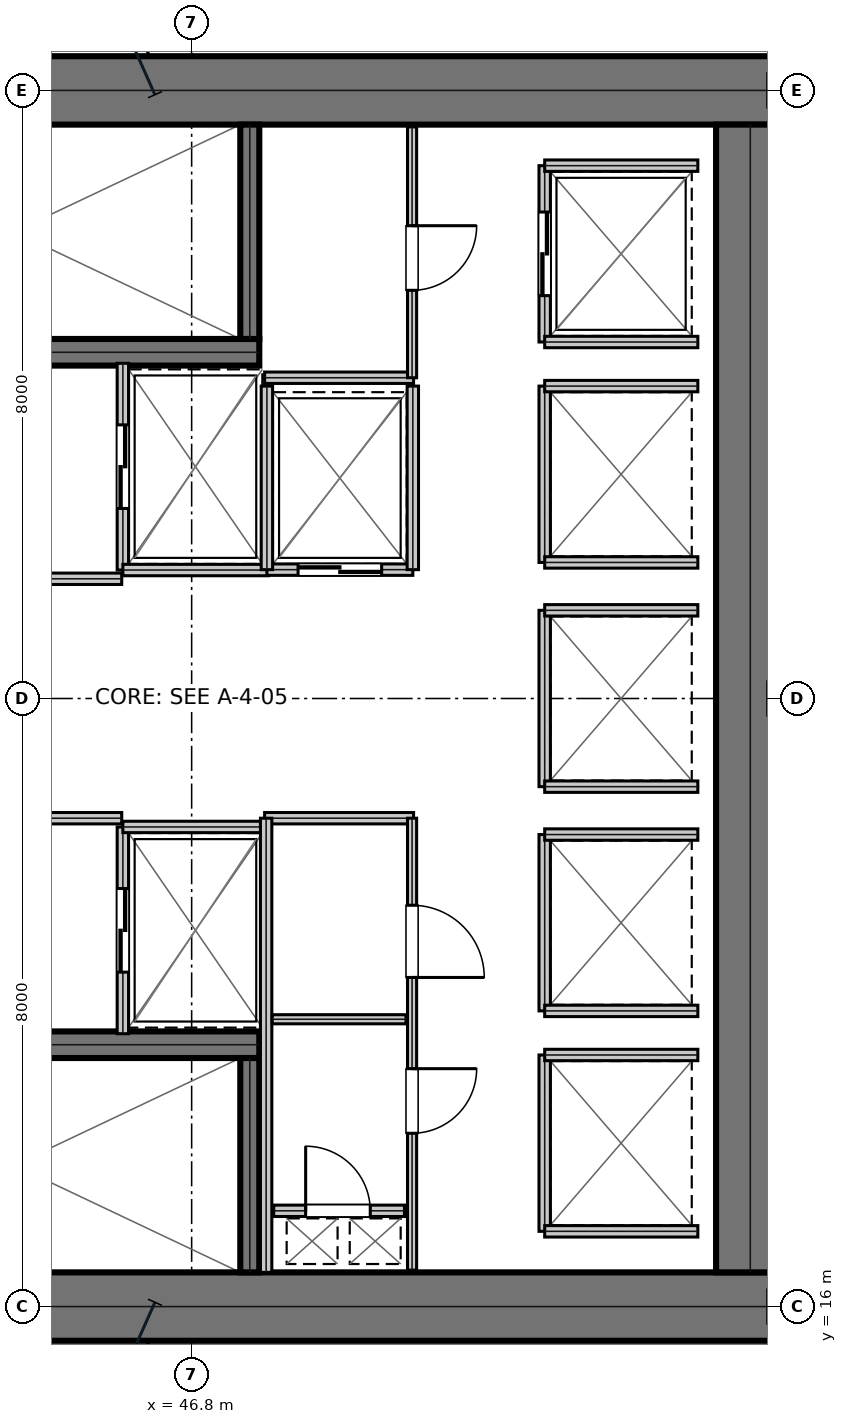
"""IFC4 building model, lengths in metres.
Left out: names, types, materials, properties, quantities, classifications, styles, units other than length and angle.
Written with IfcOpenShell. Run it as: python <this file> out.ifc"""

import sys

from ifc_helpers import new_model, si_unit, direction, frame, frame_2d, origin, place, context, subcontext, project, spatial, rectangle, extrude, element, fill, save


model = new_model("IFC4")
c1 = context("Model", 3, precision=1e-05, world=origin(), true_north=direction((0.0, 1.0)))
c2 = subcontext(c1, "Body", "Model", "MODEL_VIEW")
j1 = project(units=[si_unit("LENGTHUNIT", "METRE"), si_unit("PLANEANGLEUNIT", "RADIAN")], contexts=[c1])
p1 = place(None, origin())
s1 = spatial("IfcSite", under=j1, at=p1, CompositionType="ELEMENT")
p2 = place(p1, origin())
s2 = spatial("IfcBuilding", under=s1, at=p2, CompositionType="ELEMENT")
p3 = place(p2, frame((0.0, 0.0, 98.55)))
s3 = spatial("IfcBuildingStorey", under=s2, at=p3, CompositionType="ELEMENT", Elevation=98.55)
for number, where, z_axis, x_axis in (
    (1, (38.8, 32.0, 0.0), (0.0, 0.0, 1.0), (1.0, 0.0, 0.0)),
    (2, (38.8, 16.0, 0.0), (0.0, 0.0, 1.0), (1.0, 0.0, 0.0)),
):
    element("IfcWall", number, at=place(p3, frame(where, z_axis=z_axis, x_axis=x_axis)), inside=s3, PredefinedType="SHEAR", context=c2, shape_type="SweptSolid", body=[
        extrude(rectangle(XDim=16.0, YDim=0.9, at=frame_2d((8.0, 0.0))), origin(), (0.0, 0.0, 1.0), 3.81),
    ])
p4 = place(p3, frame((54.15, 16.45, 0.0), z_axis=(0.0, 0.0, 1.0), x_axis=(0.0, 1.0, 0.0)))
e3 = element("IfcWall", 3, at=p4, inside=s3, PredefinedType="SHEAR", context=c2, shape_type="SweptSolid", body=[
    extrude(rectangle(XDim=15.1, YDim=0.9, at=frame_2d((7.55, 0.0))), origin(), (0.0, 0.0, 1.0), 3.81),
])
p5 = place(p3, frame((39.98, 28.555, 0.0), z_axis=(0.0, 0.0, 1.0), x_axis=(1.0, 0.0, 0.0)))
e4 = element("IfcWall", 4, at=p5, inside=s3, PredefinedType="SHEAR", context=c2, shape_type="SweptSolid", body=[
    extrude(rectangle(XDim=7.71, YDim=0.35, at=frame_2d((3.855, 0.0))), origin(), (0.0, 0.0, 1.0), 3.81),
])
p6 = place(p5, frame((0.25, 0.0, 0.0)))
e5 = element("IfcOpeningElement", 5, at=p6, cuts=e4, PredefinedType="OPENING", context=c2, shape_type="SweptSolid", body=[
    extrude(rectangle(XDim=1.1, YDim=2.15, at=frame_2d((0.55, 1.075))), frame((0.0, 0.185, 0.0), z_axis=(0.0, -1.0, 0.0), x_axis=(1.0, 0.0, 0.0)), (0.0, 0.0, 1.0), 0.37),
])
p7 = place(p3, frame((39.98, 19.445, 0.0), z_axis=(0.0, 0.0, 1.0), x_axis=(1.0, 0.0, 0.0)))
e6 = element("IfcWall", 6, at=p7, inside=s3, PredefinedType="SHEAR", context=c2, shape_type="SweptSolid", body=[
    extrude(rectangle(XDim=7.71, YDim=0.35, at=frame_2d((3.855, 0.0))), origin(), (0.0, 0.0, 1.0), 3.81),
])
p8 = place(p7, frame((0.25, 0.0, 0.0)))
e7 = element("IfcOpeningElement", 7, at=p8, cuts=e6, PredefinedType="OPENING", context=c2, shape_type="SweptSolid", body=[
    extrude(rectangle(XDim=1.1, YDim=2.15, at=frame_2d((0.55, 1.075))), frame((0.0, 0.185, 0.0), z_axis=(0.0, -1.0, 0.0), x_axis=(1.0, 0.0, 0.0)), (0.0, 0.0, 1.0), 0.37),
])
for number, where, z_axis, x_axis in (
    (8, (47.565, 28.73, 0.0), (0.0, 0.0, 1.0), (0.0, 1.0, 0.0)),
    (9, (47.565, 16.45, 0.0), (0.0, 0.0, 1.0), (0.0, 1.0, 0.0)),
):
    element("IfcWall", number, at=place(p3, frame(where, z_axis=z_axis, x_axis=x_axis)), inside=s3, PredefinedType="SHEAR", context=c2, shape_type="SweptSolid", body=[
        extrude(rectangle(XDim=2.82, YDim=0.25, at=frame_2d((1.41, 0.0))), origin(), (0.0, 0.0, 1.0), 3.81),
    ])
p9 = place(p3, frame((39.98, 25.575, 0.0), z_axis=(0.0, 0.0, 1.0), x_axis=(1.0, 0.0, 0.0)))
e10 = element("IfcWall", 10, at=p9, inside=s3, PredefinedType="PARTITIONING", context=c2, shape_type="SweptSolid", body=[
    extrude(rectangle(XDim=5.9, YDim=0.15, at=frame_2d((2.95, 0.0))), origin(), (0.0, 0.0, 1.0), 3.81),
])
p10 = place(p9, frame((2.35, 0.0, 0.0)))
e11 = element("IfcOpeningElement", 11, at=p10, cuts=e10, PredefinedType="OPENING", context=c2, shape_type="SweptSolid", body=[
    extrude(rectangle(XDim=1.05, YDim=2.15, at=frame_2d((0.525, 1.075))), frame((0.0, 0.085, 0.0), z_axis=(0.0, -1.0, 0.0), x_axis=(1.0, 0.0, 0.0)), (0.0, 0.0, 1.0), 0.17),
])
p11 = place(p3, frame((39.98, 22.425, 0.0), z_axis=(0.0, 0.0, 1.0), x_axis=(1.0, 0.0, 0.0)))
e12 = element("IfcWall", 12, at=p11, inside=s3, PredefinedType="PARTITIONING", context=c2, shape_type="SweptSolid", body=[
    extrude(rectangle(XDim=5.9, YDim=0.15, at=frame_2d((2.95, 0.0))), origin(), (0.0, 0.0, 1.0), 3.81),
])
p12 = place(p11, frame((2.35, 0.0, 0.0)))
e13 = element("IfcOpeningElement", 13, at=p12, cuts=e12, PredefinedType="OPENING", context=c2, shape_type="SweptSolid", body=[
    extrude(rectangle(XDim=1.05, YDim=2.15, at=frame_2d((0.525, 1.075))), frame((0.0, 0.085, 0.0), z_axis=(0.0, -1.0, 0.0), x_axis=(1.0, 0.0, 0.0)), (0.0, 0.0, 1.0), 0.17),
])
p13 = place(p3, frame((45.895, 25.69, 0.0), z_axis=(0.0, 0.0, 1.0), x_axis=(0.0, 1.0, 0.0)))
e14 = element("IfcWall", 14, at=p13, inside=s3, PredefinedType="PARTITIONING", context=c2, shape_type="SweptSolid", body=[
    extrude(rectangle(XDim=2.72, YDim=0.15, at=frame_2d((1.36, 0.0))), origin(), (0.0, 0.0, 1.0), 3.81),
])
p14 = place(p13, frame((0.81, 0.0, 0.0)))
e15 = element("IfcOpeningElement", 15, at=p14, cuts=e14, PredefinedType="OPENING", context=c2, shape_type="SweptSolid", body=[
    extrude(rectangle(XDim=1.1, YDim=2.15, at=frame_2d((0.55, 1.075))), frame((0.0, 0.085, 0.0), z_axis=(0.0, -1.0, 0.0), x_axis=(1.0, 0.0, 0.0)), (0.0, 0.0, 1.0), 0.17),
])
p15 = place(p3, frame((45.895, 25.69, 0.0), z_axis=(0.0, 0.0, 1.0), x_axis=(1.0, 0.0, 0.0)))
e16 = element("IfcWall", 16, at=p15, inside=s3, PredefinedType="PARTITIONING", context=c2, shape_type="SweptSolid", body=[
    extrude(rectangle(XDim=1.915, YDim=0.15, at=frame_2d((0.958, 0.0))), origin(), (0.0, 0.0, 1.0), 3.81),
])
p16 = place(p3, frame((45.895, 19.59, 0.0), z_axis=(0.0, 0.0, 1.0), x_axis=(0.0, 1.0, 0.0)))
e17 = element("IfcWall", 17, at=p16, inside=s3, PredefinedType="PARTITIONING", context=c2, shape_type="SweptSolid", body=[
    extrude(rectangle(XDim=2.72, YDim=0.15, at=frame_2d((1.36, 0.0))), origin(), (0.0, 0.0, 1.0), 3.81),
])
p17 = place(p16, frame((0.81, 0.0, 0.0)))
e18 = element("IfcOpeningElement", 18, at=p17, cuts=e17, PredefinedType="OPENING", context=c2, shape_type="SweptSolid", body=[
    extrude(rectangle(XDim=1.1, YDim=2.15, at=frame_2d((0.55, 1.075))), frame((0.0, 0.085, 0.0), z_axis=(0.0, -1.0, 0.0), x_axis=(1.0, 0.0, 0.0)), (0.0, 0.0, 1.0), 0.17),
])
p18 = place(p3, frame((45.895, 22.31, 0.0), z_axis=(0.0, 0.0, 1.0), x_axis=(1.0, 0.0, 0.0)))
e19 = element("IfcWall", 19, at=p18, inside=s3, PredefinedType="PARTITIONING", context=c2, shape_type="SweptSolid", body=[
    extrude(rectangle(XDim=1.915, YDim=0.15, at=frame_2d((0.958, 0.0))), origin(), (0.0, 0.0, 1.0), 3.81),
])
p19 = place(p3, frame((47.79, 25.695, 0.0), z_axis=(0.0, 0.0, 1.0), x_axis=(1.0, 0.0, 0.0)))
e20 = element("IfcWall", 20, at=p19, inside=s3, PredefinedType="PARTITIONING", context=c2, shape_type="SweptSolid", body=[
    extrude(rectangle(XDim=1.92, YDim=0.15, at=frame_2d((0.96, 0.0))), origin(), (0.0, 0.0, 1.0), 3.81),
])
p20 = place(p19, frame((0.41, 0.0, 0.0)))
e21 = element("IfcOpeningElement", 21, at=p20, cuts=e20, PredefinedType="OPENING", context=c2, shape_type="SweptSolid", body=[
    extrude(rectangle(XDim=1.1, YDim=2.15, at=frame_2d((0.55, 1.075))), frame((0.0, 0.085, 0.0), z_axis=(0.0, -1.0, 0.0), x_axis=(1.0, 0.0, 0.0)), (0.0, 0.0, 1.0), 0.17),
])
for number, where, z_axis, x_axis in (
    (22, (47.79, 25.695, 0.0), (0.0, 0.0, 1.0), (0.0, 1.0, 0.0)),
    (23, (49.71, 25.695, 0.0), (0.0, 0.0, 1.0), (0.0, 1.0, 0.0)),
):
    element("IfcWall", number, at=place(p3, frame(where, z_axis=z_axis, x_axis=x_axis)), inside=s3, PredefinedType="PARTITIONING", context=c2, shape_type="SweptSolid", body=[
        extrude(rectangle(XDim=2.415, YDim=0.15, at=frame_2d((1.208, 0.0))), origin(), (0.0, 0.0, 1.0), 3.81),
    ])
p21 = place(p3, frame((51.445, 28.69, 0.0), z_axis=(0.0, 0.0, 1.0), x_axis=(0.0, 1.0, 0.0)))
e24 = element("IfcWall", 24, at=p21, inside=s3, PredefinedType="PARTITIONING", context=c2, shape_type="SweptSolid", body=[
    extrude(rectangle(XDim=2.32, YDim=0.15, at=frame_2d((1.16, 0.0))), origin(), (0.0, 0.0, 1.0), 3.81),
])
p22 = place(p21, frame((0.61, 0.0, 0.0)))
e25 = element("IfcOpeningElement", 25, at=p22, cuts=e24, PredefinedType="OPENING", context=c2, shape_type="SweptSolid", body=[
    extrude(rectangle(XDim=1.1, YDim=2.15, at=frame_2d((0.55, 1.075))), frame((0.0, 0.085, 0.0), z_axis=(0.0, -1.0, 0.0), x_axis=(1.0, 0.0, 0.0)), (0.0, 0.0, 1.0), 0.17),
])
for number, where, z_axis, x_axis in (
    (26, (51.445, 28.69, 0.0), (0.0, 0.0, 1.0), (1.0, 0.0, 0.0)),
    (27, (51.445, 31.01, 0.0), (0.0, 0.0, 1.0), (1.0, 0.0, 0.0)),
):
    element("IfcWall", number, at=place(p3, frame(where, z_axis=z_axis, x_axis=x_axis)), inside=s3, PredefinedType="PARTITIONING", context=c2, shape_type="SweptSolid", body=[
        extrude(rectangle(XDim=2.015, YDim=0.15, at=frame_2d((1.007, 0.0))), origin(), (0.0, 0.0, 1.0), 3.81),
    ])
p23 = place(p3, frame((51.445, 25.79, 0.0), z_axis=(0.0, 0.0, 1.0), x_axis=(0.0, 1.0, 0.0)))
e28 = element("IfcWall", 28, at=p23, inside=s3, PredefinedType="PARTITIONING", context=c2, shape_type="SweptSolid", body=[
    extrude(rectangle(XDim=2.32, YDim=0.15, at=frame_2d((1.16, 0.0))), origin(), (0.0, 0.0, 1.0), 3.81),
])
for number, where, z_axis, x_axis in (
    (29, (51.445, 25.79, 0.0), (0.0, 0.0, 1.0), (1.0, 0.0, 0.0)),
    (30, (51.445, 28.11, 0.0), (0.0, 0.0, 1.0), (1.0, 0.0, 0.0)),
):
    element("IfcWall", number, at=place(p3, frame(where, z_axis=z_axis, x_axis=x_axis)), inside=s3, PredefinedType="PARTITIONING", context=c2, shape_type="SweptSolid", body=[
        extrude(rectangle(XDim=2.015, YDim=0.15, at=frame_2d((1.007, 0.0))), origin(), (0.0, 0.0, 1.0), 3.81),
    ])
p24 = place(p3, frame((51.445, 19.89, 0.0), z_axis=(0.0, 0.0, 1.0), x_axis=(0.0, 1.0, 0.0)))
e31 = element("IfcWall", 31, at=p24, inside=s3, PredefinedType="PARTITIONING", context=c2, shape_type="SweptSolid", body=[
    extrude(rectangle(XDim=2.32, YDim=0.15, at=frame_2d((1.16, 0.0))), origin(), (0.0, 0.0, 1.0), 3.81),
])
for number, where, z_axis, x_axis in (
    (32, (51.445, 19.89, 0.0), (0.0, 0.0, 1.0), (1.0, 0.0, 0.0)),
    (33, (51.445, 22.21, 0.0), (0.0, 0.0, 1.0), (1.0, 0.0, 0.0)),
):
    element("IfcWall", number, at=place(p3, frame(where, z_axis=z_axis, x_axis=x_axis)), inside=s3, PredefinedType="PARTITIONING", context=c2, shape_type="SweptSolid", body=[
        extrude(rectangle(XDim=2.015, YDim=0.15, at=frame_2d((1.007, 0.0))), origin(), (0.0, 0.0, 1.0), 3.81),
    ])
p25 = place(p3, frame((51.445, 22.84, 0.0), z_axis=(0.0, 0.0, 1.0), x_axis=(0.0, 1.0, 0.0)))
e34 = element("IfcWall", 34, at=p25, inside=s3, PredefinedType="PARTITIONING", context=c2, shape_type="SweptSolid", body=[
    extrude(rectangle(XDim=2.32, YDim=0.15, at=frame_2d((1.16, 0.0))), origin(), (0.0, 0.0, 1.0), 3.81),
])
for number, where, z_axis, x_axis in (
    (35, (51.445, 22.84, 0.0), (0.0, 0.0, 1.0), (1.0, 0.0, 0.0)),
    (36, (51.445, 25.16, 0.0), (0.0, 0.0, 1.0), (1.0, 0.0, 0.0)),
):
    element("IfcWall", number, at=place(p3, frame(where, z_axis=z_axis, x_axis=x_axis)), inside=s3, PredefinedType="PARTITIONING", context=c2, shape_type="SweptSolid", body=[
        extrude(rectangle(XDim=2.015, YDim=0.15, at=frame_2d((1.007, 0.0))), origin(), (0.0, 0.0, 1.0), 3.81),
    ])
p26 = place(p3, frame((51.445, 16.99, 0.0), z_axis=(0.0, 0.0, 1.0), x_axis=(0.0, 1.0, 0.0)))
e37 = element("IfcWall", 37, at=p26, inside=s3, PredefinedType="PARTITIONING", context=c2, shape_type="SweptSolid", body=[
    extrude(rectangle(XDim=2.32, YDim=0.15, at=frame_2d((1.16, 0.0))), origin(), (0.0, 0.0, 1.0), 3.81),
])
for number, where, z_axis, x_axis in (
    (38, (51.445, 16.99, 0.0), (0.0, 0.0, 1.0), (1.0, 0.0, 0.0)),
    (39, (51.445, 19.31, 0.0), (0.0, 0.0, 1.0), (1.0, 0.0, 0.0)),
):
    element("IfcWall", number, at=place(p3, frame(where, z_axis=z_axis, x_axis=x_axis)), inside=s3, PredefinedType="PARTITIONING", context=c2, shape_type="SweptSolid", body=[
        extrude(rectangle(XDim=2.015, YDim=0.15, at=frame_2d((1.007, 0.0))), origin(), (0.0, 0.0, 1.0), 3.81),
    ])
p27 = place(p3, frame((47.88, 17.26, 0.0), z_axis=(0.0, 0.0, 1.0), x_axis=(1.0, 0.0, 0.0)))
e40 = element("IfcWall", 40, at=p27, inside=s3, PredefinedType="PARTITIONING", context=c2, shape_type="SweptSolid", body=[
    extrude(rectangle(XDim=1.72, YDim=0.15, at=frame_2d((0.86, 0.0))), origin(), (0.0, 0.0, 1.0), 3.81),
])
p28 = place(p27, frame((0.42, 0.0, 0.0)))
e41 = element("IfcOpeningElement", 41, at=p28, cuts=e40, PredefinedType="OPENING", context=c2, shape_type="SweptSolid", body=[
    extrude(rectangle(XDim=0.85, YDim=2.15, at=frame_2d((0.425, 1.075))), frame((0.0, 0.085, 0.0), z_axis=(0.0, -1.0, 0.0), x_axis=(1.0, 0.0, 0.0)), (0.0, 0.0, 1.0), 0.17),
])
p29 = place(p3, frame((47.76, 22.425, 0.0), z_axis=(0.0, 0.0, 1.0), x_axis=(1.0, 0.0, 0.0)))
e42 = element("IfcWall", 42, at=p29, inside=s3, PredefinedType="PARTITIONING", context=c2, shape_type="SweptSolid", body=[
    extrude(rectangle(XDim=1.96, YDim=0.15, at=frame_2d((0.98, 0.0))), origin(), (0.0, 0.0, 1.0), 3.81),
])
p30 = place(p3, frame((47.78, 16.45, 0.0), z_axis=(0.0, 0.0, 1.0), x_axis=(0.0, 1.0, 0.0)))
e43 = element("IfcWall", 43, at=p30, inside=s3, PredefinedType="PARTITIONING", context=c2, shape_type="SweptSolid", body=[
    extrude(rectangle(XDim=5.975, YDim=0.15, at=frame_2d((2.988, 0.0))), origin(), (0.0, 0.0, 1.0), 3.81),
])
p31 = place(p3, frame((47.86, 19.78, 0.0), z_axis=(0.0, 0.0, 1.0), x_axis=(1.0, 0.0, 0.0)))
e44 = element("IfcWall", 44, at=p31, inside=s3, PredefinedType="PARTITIONING", context=c2, shape_type="SweptSolid", body=[
    extrude(rectangle(XDim=1.76, YDim=0.12, at=frame_2d((0.88, 0.0))), origin(), (0.0, 0.0, 1.0), 3.81),
])
p32 = place(p3, frame((49.7, 16.48, 0.0), z_axis=(0.0, 0.0, 1.0), x_axis=(0.0, 1.0, 0.0)))
e45 = element("IfcWall", 45, at=p32, inside=s3, PredefinedType="PARTITIONING", context=c2, shape_type="SweptSolid", body=[
    extrude(rectangle(XDim=5.945, YDim=0.12, at=frame_2d((2.973, 0.0))), origin(), (0.0, 0.0, 1.0), 3.81),
])
p33 = place(p32, frame((1.8, 0.0, 0.0)))
e46 = element("IfcOpeningElement", 46, at=p33, cuts=e45, PredefinedType="OPENING", context=c2, shape_type="SweptSolid", body=[
    extrude(rectangle(XDim=0.85, YDim=2.15, at=frame_2d((0.425, 1.075))), frame((0.0, 0.07, 0.0), z_axis=(0.0, -1.0, 0.0), x_axis=(1.0, 0.0, 0.0)), (0.0, 0.0, 1.0), 0.14),
])
p34 = place(p32, frame((3.85, 0.0, 0.0)))
e47 = element("IfcOpeningElement", 47, at=p34, cuts=e45, PredefinedType="OPENING", context=c2, shape_type="SweptSolid", body=[
    extrude(rectangle(XDim=0.95, YDim=2.15, at=frame_2d((0.475, 1.075))), frame((0.0, 0.07, 0.0), z_axis=(0.0, -1.0, 0.0), x_axis=(1.0, 0.0, 0.0)), (0.0, 0.0, 1.0), 0.14),
])
p35 = place(p3, frame((47.76, 28.22, 0.0), z_axis=(0.0, 0.0, 1.0), x_axis=(1.0, 0.0, 0.0)))
e48 = element("IfcWall", 48, at=p35, inside=s3, PredefinedType="PARTITIONING", context=c2, shape_type="SweptSolid", body=[
    extrude(rectangle(XDim=1.96, YDim=0.15, at=frame_2d((0.98, 0.0))), origin(), (0.0, 0.0, 1.0), 3.81),
])
p36 = place(p3, frame((49.7, 28.22, 0.0), z_axis=(0.0, 0.0, 1.0), x_axis=(0.0, 1.0, 0.0)))
e49 = element("IfcWall", 49, at=p36, inside=s3, PredefinedType="PARTITIONING", context=c2, shape_type="SweptSolid", body=[
    extrude(rectangle(XDim=3.3, YDim=0.12, at=frame_2d((1.65, 0.0))), origin(), (0.0, 0.0, 1.0), 3.81),
])
p37 = place(p36, frame((1.15, 0.0, 0.0)))
e50 = element("IfcOpeningElement", 50, at=p37, cuts=e49, PredefinedType="OPENING", context=c2, shape_type="SweptSolid", body=[
    extrude(rectangle(XDim=0.85, YDim=2.15, at=frame_2d((0.425, 1.075))), frame((0.0, 0.07, 0.0), z_axis=(0.0, -1.0, 0.0), x_axis=(1.0, 0.0, 0.0)), (0.0, 0.0, 1.0), 0.14),
])
p38 = place(p14, frame((1.1, 0.0, 0.0), z_axis=(0.0, 0.0, 1.0), x_axis=(-1.0, 0.0, 0.0)))
e51 = element("IfcDoor", 51, at=p38, inside=s3, OperationType="DOUBLE_DOOR_SLIDING", PredefinedType="DOOR", context=c2, shape_type="SweptSolid", body=[
    extrude(rectangle(XDim=1.1, YDim=2.15, at=frame_2d((0.55, 1.075))), frame((0.0, 0.025, 0.0), z_axis=(0.0, -1.0, 0.0), x_axis=(1.0, 0.0, 0.0)), (0.0, 0.0, 1.0), 0.05),
])
fill(e15, e51)
p39 = place(p17, frame((1.1, 0.0, 0.0), z_axis=(0.0, 0.0, 1.0), x_axis=(-1.0, 0.0, 0.0)))
e52 = element("IfcDoor", 52, at=p39, inside=s3, OperationType="DOUBLE_DOOR_SLIDING", PredefinedType="DOOR", context=c2, shape_type="SweptSolid", body=[
    extrude(rectangle(XDim=1.1, YDim=2.15, at=frame_2d((0.55, 1.075))), frame((0.0, 0.025, 0.0), z_axis=(0.0, -1.0, 0.0), x_axis=(1.0, 0.0, 0.0)), (0.0, 0.0, 1.0), 0.05),
])
fill(e18, e52)
p40 = place(p20, frame((1.1, 0.0, 0.0), z_axis=(0.0, 0.0, 1.0), x_axis=(-1.0, 0.0, 0.0)))
e53 = element("IfcDoor", 53, at=p40, inside=s3, OperationType="DOUBLE_DOOR_SLIDING", PredefinedType="DOOR", context=c2, shape_type="SweptSolid", body=[
    extrude(rectangle(XDim=1.1, YDim=2.15, at=frame_2d((0.55, 1.075))), frame((0.0, 0.025, 0.0), z_axis=(0.0, -1.0, 0.0), x_axis=(1.0, 0.0, 0.0)), (0.0, 0.0, 1.0), 0.05),
])
fill(e21, e53)
p41 = place(p22, frame((1.1, 0.0, 0.0), z_axis=(0.0, 0.0, 1.0), x_axis=(-1.0, 0.0, 0.0)))
e54 = element("IfcDoor", 54, at=p41, inside=s3, OperationType="DOUBLE_DOOR_SLIDING", PredefinedType="DOOR", context=c2, shape_type="SweptSolid", body=[
    extrude(rectangle(XDim=1.1, YDim=2.15, at=frame_2d((0.55, 1.075))), frame((0.0, 0.025, 0.0), z_axis=(0.0, -1.0, 0.0), x_axis=(1.0, 0.0, 0.0)), (0.0, 0.0, 1.0), 0.05),
])
fill(e25, e54)
p42 = place(p28, origin())
e55 = element("IfcDoor", 55, at=p42, inside=s3, OperationType="SINGLE_SWING_LEFT", PredefinedType="TRAPDOOR", context=c2, shape_type="SweptSolid", body=[
    extrude(rectangle(XDim=0.85, YDim=2.15, at=frame_2d((0.425, 1.075))), frame((0.0, 0.025, 0.0), z_axis=(0.0, -1.0, 0.0), x_axis=(1.0, 0.0, 0.0)), (0.0, 0.0, 1.0), 0.05),
])
fill(e41, e55)
p43 = place(p33, frame((0.85, 0.0, 0.0), z_axis=(0.0, 0.0, 1.0), x_axis=(-1.0, 0.0, 0.0)))
e56 = element("IfcDoor", 56, at=p43, inside=s3, OperationType="SINGLE_SWING_LEFT", PredefinedType="DOOR", context=c2, shape_type="SweptSolid", body=[
    extrude(rectangle(XDim=0.85, YDim=2.15, at=frame_2d((0.425, 1.075))), frame((0.0, 0.025, 0.0), z_axis=(0.0, -1.0, 0.0), x_axis=(1.0, 0.0, 0.0)), (0.0, 0.0, 1.0), 0.05),
])
fill(e46, e56)
p44 = place(p34, frame((0.95, 0.0, 0.0), z_axis=(0.0, 0.0, 1.0), x_axis=(-1.0, 0.0, 0.0)))
e57 = element("IfcDoor", 57, at=p44, inside=s3, OperationType="SINGLE_SWING_RIGHT", PredefinedType="DOOR", context=c2, shape_type="SweptSolid", body=[
    extrude(rectangle(XDim=0.95, YDim=2.15, at=frame_2d((0.475, 1.075))), frame((0.0, 0.025, 0.0), z_axis=(0.0, -1.0, 0.0), x_axis=(1.0, 0.0, 0.0)), (0.0, 0.0, 1.0), 0.05),
])
fill(e47, e57)
p45 = place(p37, frame((0.85, 0.0, 0.0), z_axis=(0.0, 0.0, 1.0), x_axis=(-1.0, 0.0, 0.0)))
e58 = element("IfcDoor", 58, at=p45, inside=s3, OperationType="SINGLE_SWING_LEFT", PredefinedType="DOOR", context=c2, shape_type="SweptSolid", body=[
    extrude(rectangle(XDim=0.85, YDim=2.15, at=frame_2d((0.425, 1.075))), frame((0.0, 0.025, 0.0), z_axis=(0.0, -1.0, 0.0), x_axis=(1.0, 0.0, 0.0)), (0.0, 0.0, 1.0), 0.05),
])
fill(e50, e58)
save(model, sys.argv[1])
